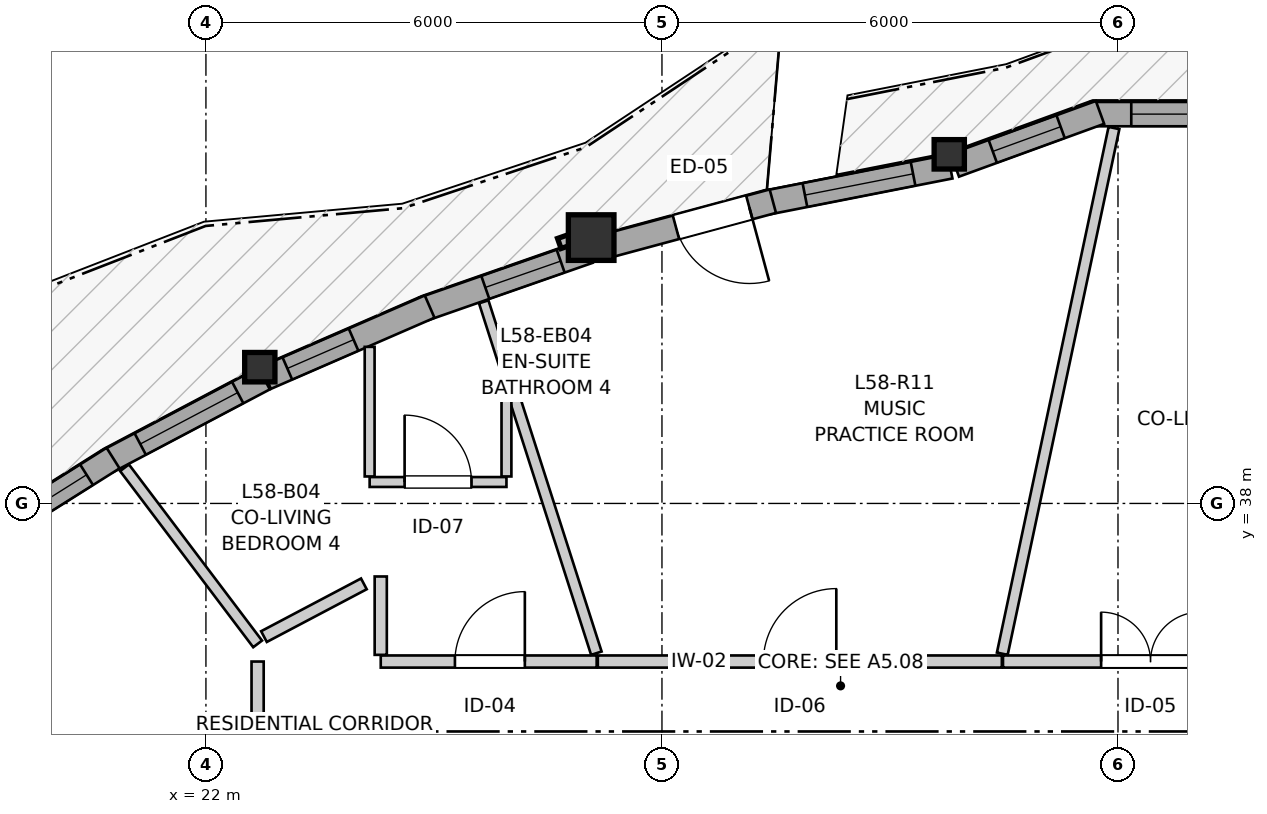
"""IFC4 building model, lengths in metres.
Left out: names, types, materials, properties, quantities, classifications, styles, units other than length and angle.
Written with IfcOpenShell. Run it as: python <this file> out.ifc"""

import sys

from ifc_helpers import new_model, si_unit, direction, frame, frame_2d, origin, origin_2d, place, context, subcontext, project, spatial, rectangle, i_section, extrude, source, transform, mapped, element, fill, save


model = new_model("IFC4")
c1 = context("Model", 3, precision=1e-05, world=origin(), true_north=direction((0.0, 1.0)))
c2 = subcontext(c1, "Body", "Model", "MODEL_VIEW")
j1 = project(units=[si_unit("LENGTHUNIT", "METRE"), si_unit("PLANEANGLEUNIT", "RADIAN")], contexts=[c1])
p1 = place(None, origin())
s1 = spatial("IfcSite", under=j1, at=p1, CompositionType="ELEMENT")
p2 = place(p1, origin())
s2 = spatial("IfcBuilding", under=s1, at=p2, CompositionType="ELEMENT")
p3 = place(p2, frame((0.0, 0.0, 195.6)))
s3 = spatial("IfcBuildingStorey", under=s2, at=p3, CompositionType="ELEMENT", Elevation=195.6)
m1 = source(origin(), c2, "Body", "SweptSolid", [
    extrude(i_section(OverallWidth=0.398, OverallDepth=0.387, WebThickness=0.019, FlangeThickness=0.03, FilletRadius=0.015, at=origin_2d()), origin(), (0.0, 0.0, 1.0), 2.96),
])
p4 = place(p3, frame((31.78, 42.593, 0.0), z_axis=(0.0, 0.0, 1.0), x_axis=(1.0, 0.0, 0.0)))
e1 = element("IfcColumn", 1, at=p4, inside=s3, PredefinedType="PILASTER", context=c2, shape_type="MappedRepresentation", body=[
    mapped(m1, transform((0.0, 0.0, 0.0), x_axis=(1.0, 0.0, 0.0), y_axis=(0.0, 1.0, 0.0), z_axis=(0.0, 0.0, 1.0), scale=1.0)),
])
m2 = source(origin(), c2, "Body", "SweptSolid", [
    extrude(rectangle(XDim=0.6, YDim=0.6, at=origin_2d()), origin(), (0.0, 0.0, 1.0), 2.96),
])
p5 = place(p3, frame((27.069, 41.498, 0.0), z_axis=(0.0, 0.0, 1.0), x_axis=(1.0, 0.0, 0.0)))
e2 = element("IfcColumn", 2, at=p5, inside=s3, PredefinedType="COLUMN", context=c2, shape_type="MappedRepresentation", body=[
    mapped(m2, transform((0.0, 0.0, 0.0), x_axis=(1.0, 0.0, 0.0), y_axis=(0.0, 1.0, 0.0), z_axis=(0.0, 0.0, 1.0), scale=1.0)),
])
p6 = place(p3, frame((22.709, 39.793, 0.0), z_axis=(0.0, 0.0, 1.0), x_axis=(1.0, 0.0, 0.0)))
e3 = element("IfcColumn", 3, at=p6, inside=s3, PredefinedType="PILASTER", context=c2, shape_type="MappedRepresentation", body=[
    mapped(m1, transform((0.0, 0.0, 0.0), x_axis=(1.0, 0.0, 0.0), y_axis=(0.0, 1.0, 0.0), z_axis=(0.0, 0.0, 1.0), scale=1.0)),
])
p7 = place(p3, frame((35.725, 43.122, 0.0), z_axis=(0.0, 0.0, 1.0), x_axis=(-1.0, 0.0, 0.0)))
e4 = element("IfcWall", 4, at=p7, inside=s3, PredefinedType="SOLIDWALL", context=c2, shape_type="SweptSolid", body=[
    extrude(rectangle(XDim=2.09, YDim=0.32, at=frame_2d((1.045, 0.0))), origin(), (0.0, 0.0, 1.0), 2.58),
])
p8 = place(p7, frame((0.301, 0.0, 0.82)))
e5 = element("IfcOpeningElement", 5, at=p8, cuts=e4, PredefinedType="OPENING", context=c2, shape_type="SweptSolid", body=[
    extrude(rectangle(XDim=1.25, YDim=1.35, at=frame_2d((0.625, 0.675))), frame((0.0, 0.17, 0.0), z_axis=(0.0, -1.0, 0.0), x_axis=(1.0, 0.0, 0.0)), (0.0, 0.0, 1.0), 0.34),
])
p9 = place(p3, frame((33.763, 43.145, 0.0), z_axis=(0.0, 0.0, 1.0), x_axis=(-0.939691662178, -0.342022777067, 0.0)))
e6 = element("IfcWall", 6, at=p9, inside=s3, PredefinedType="SOLIDWALL", context=c2, shape_type="SweptSolid", body=[
    extrude(rectangle(XDim=2.032, YDim=0.32, at=frame_2d((1.016, 0.0))), origin(), (0.0, 0.0, 1.0), 2.58),
])
p10 = place(p9, frame((0.551, 0.0, 0.82)))
e7 = element("IfcOpeningElement", 7, at=p10, cuts=e6, PredefinedType="OPENING", context=c2, shape_type="SweptSolid", body=[
    extrude(rectangle(XDim=0.95, YDim=1.35, at=frame_2d((0.475, 0.675))), frame((0.0, 0.17, 0.0), z_axis=(0.0, -1.0, 0.0), x_axis=(1.0, 0.0, 0.0)), (0.0, 0.0, 1.0), 0.34),
])
p11 = place(p3, frame((31.791, 42.432, 0.0), z_axis=(0.0, 0.0, 1.0), x_axis=(-0.981230743763, -0.192837308358, 0.0)))
e8 = element("IfcWall", 8, at=p11, inside=s3, PredefinedType="SOLIDWALL", context=c2, shape_type="SweptSolid", body=[
    extrude(rectangle(XDim=2.464, YDim=0.32, at=frame_2d((1.232, 0.0))), origin(), (0.0, 0.0, 1.0), 2.58),
])
p12 = place(p11, frame((0.497, 0.0, 0.82)))
e9 = element("IfcOpeningElement", 9, at=p12, cuts=e8, PredefinedType="OPENING", context=c2, shape_type="SweptSolid", body=[
    extrude(rectangle(XDim=1.45, YDim=1.25, at=frame_2d((0.725, 0.625))), frame((0.0, 0.17, 0.0), z_axis=(0.0, -1.0, 0.0), x_axis=(1.0, 0.0, 0.0)), (0.0, 0.0, 1.0), 0.34),
])
p13 = place(p3, frame((29.459, 41.977, 0.0), z_axis=(0.0, 0.0, 1.0), x_axis=(-0.965462644558, -0.260541516774, 0.0)))
e10 = element("IfcWall", 10, at=p13, inside=s3, PredefinedType="SOLIDWALL", context=c2, shape_type="SweptSolid", body=[
    extrude(rectangle(XDim=2.343, YDim=0.32, at=frame_2d((1.171, 0.0))), origin(), (0.0, 0.0, 1.0), 2.58),
])
p14 = place(p13, frame((0.32, 0.0, 0.0)))
e11 = element("IfcOpeningElement", 11, at=p14, cuts=e10, PredefinedType="OPENING", context=c2, shape_type="SweptSolid", body=[
    extrude(rectangle(XDim=1.0, YDim=2.1, at=frame_2d((0.5, 1.05))), frame((0.0, 0.17, 0.0), z_axis=(0.0, -1.0, 0.0), x_axis=(1.0, 0.0, 0.0)), (0.0, 0.0, 1.0), 0.34),
])
p15 = place(p3, frame((27.036, 41.317, 0.0), z_axis=(0.0, 0.0, 1.0), x_axis=(-0.944115832513, -0.329613857108, 0.0)))
e12 = element("IfcWall", 12, at=p15, inside=s3, PredefinedType="SOLIDWALL", context=c2, shape_type="SweptSolid", body=[
    extrude(rectangle(XDim=2.303, YDim=0.32, at=frame_2d((1.152, 0.0))), origin(), (0.0, 0.0, 1.0), 2.58),
])
p16 = place(p15, frame((0.391, 0.0, 0.82)))
e13 = element("IfcOpeningElement", 13, at=p16, cuts=e12, PredefinedType="OPENING", context=c2, shape_type="SweptSolid", body=[
    extrude(rectangle(XDim=1.05, YDim=1.45, at=frame_2d((0.525, 0.725))), frame((0.0, 0.17, 0.0), z_axis=(0.0, -1.0, 0.0), x_axis=(1.0, 0.0, 0.0)), (0.0, 0.0, 1.0), 0.34),
])
p17 = place(p3, frame((24.943, 40.59, 0.0), z_axis=(0.0, 0.0, 1.0), x_axis=(-0.917071710038, -0.398722307688, 0.0)))
e14 = element("IfcWall", 14, at=p17, inside=s3, PredefinedType="SOLIDWALL", context=c2, shape_type="SweptSolid", body=[
    extrude(rectangle(XDim=2.347, YDim=0.32, at=frame_2d((1.173, 0.0))), origin(), (0.0, 0.0, 1.0), 2.58),
])
p18 = place(p17, frame((1.091, 0.0, 0.82)))
e15 = element("IfcOpeningElement", 15, at=p18, cuts=e14, PredefinedType="OPENING", context=c2, shape_type="SweptSolid", body=[
    extrude(rectangle(XDim=0.95, YDim=1.35, at=frame_2d((0.475, 0.675))), frame((0.0, 0.17, 0.0), z_axis=(0.0, -1.0, 0.0), x_axis=(1.0, 0.0, 0.0)), (0.0, 0.0, 1.0), 0.34),
])
p19 = place(p3, frame((22.766, 39.642, 0.0), z_axis=(0.0, 0.0, 1.0), x_axis=(-0.884377555637, -0.466772256122, 0.0)))
e16 = element("IfcWall", 16, at=p19, inside=s3, PredefinedType="SOLIDWALL", context=c2, shape_type="SweptSolid", body=[
    extrude(rectangle(XDim=2.334, YDim=0.32, at=frame_2d((1.167, 0.0))), origin(), (0.0, 0.0, 1.0), 2.58),
])
p20 = place(p19, frame((0.393, 0.0, 0.82)))
e17 = element("IfcOpeningElement", 17, at=p20, cuts=e16, PredefinedType="OPENING", context=c2, shape_type="SweptSolid", body=[
    extrude(rectangle(XDim=1.45, YDim=1.25, at=frame_2d((0.725, 0.625))), frame((0.0, 0.17, 0.0), z_axis=(0.0, -1.0, 0.0), x_axis=(1.0, 0.0, 0.0)), (0.0, 0.0, 1.0), 0.34),
])
p21 = place(p3, frame((20.778, 38.597, 0.0), z_axis=(0.0, 0.0, 1.0), x_axis=(-0.84639489148, -0.532555807101, 0.0)))
e18 = element("IfcWall", 18, at=p21, inside=s3, PredefinedType="SOLIDWALL", context=c2, shape_type="SweptSolid", body=[
    extrude(rectangle(XDim=2.264, YDim=0.32, at=frame_2d((1.132, 0.0))), origin(), (0.0, 0.0, 1.0), 2.58),
])
p22 = place(p21, frame((0.412, 0.0, 0.82)))
e19 = element("IfcOpeningElement", 19, at=p22, cuts=e18, PredefinedType="OPENING", context=c2, shape_type="SweptSolid", body=[
    extrude(rectangle(XDim=1.45, YDim=1.25, at=frame_2d((0.725, 0.625))), frame((0.0, 0.17, 0.0), z_axis=(0.0, -1.0, 0.0), x_axis=(1.0, 0.0, 0.0)), (0.0, 0.0, 1.0), 0.34),
])
p23 = place(p3, frame((27.156, 35.92, 0.0), z_axis=(0.0, 0.0, 1.0), x_axis=(1.0, 0.0, 0.0)))
e20 = element("IfcWall", 20, at=p23, inside=s3, PredefinedType="PARTITIONING", context=c2, shape_type="SweptSolid", body=[
    extrude(rectangle(XDim=5.316, YDim=0.16, at=frame_2d((2.658, 0.0))), origin(), (0.0, 0.0, 1.0), 2.628),
])
p24 = place(p23, frame((2.178, 0.0, 0.0)))
e21 = element("IfcOpeningElement", 21, at=p24, cuts=e20, PredefinedType="OPENING", context=c2, shape_type="SweptSolid", body=[
    extrude(rectangle(XDim=0.96, YDim=2.1, at=frame_2d((0.48, 1.05))), frame((0.0, 0.09, 0.0), z_axis=(0.0, -1.0, 0.0), x_axis=(1.0, 0.0, 0.0)), (0.0, 0.0, 1.0), 0.18),
])
p25 = place(p3, frame((32.487, 35.92, 0.0), z_axis=(0.0, 0.0, 1.0), x_axis=(1.0, 0.0, 0.0)))
e22 = element("IfcWall", 22, at=p25, inside=s3, PredefinedType="PARTITIONING", context=c2, shape_type="SweptSolid", body=[
    extrude(rectangle(XDim=3.913, YDim=0.16, at=frame_2d((1.957, 0.0))), origin(), (0.0, 0.0, 1.0), 2.628),
])
p26 = place(p25, frame((1.291, 0.0, 0.0)))
e23 = element("IfcOpeningElement", 23, at=p26, cuts=e22, PredefinedType="OPENING", context=c2, shape_type="SweptSolid", body=[
    extrude(rectangle(XDim=1.3, YDim=2.1, at=frame_2d((0.65, 1.05))), frame((0.0, 0.09, 0.0), z_axis=(0.0, -1.0, 0.0), x_axis=(1.0, 0.0, 0.0)), (0.0, 0.0, 1.0), 0.18),
])
p27 = place(p3, frame((24.3, 35.92, 0.0), z_axis=(0.0, 0.0, 1.0), x_axis=(1.0, 0.0, 0.0)))
e24 = element("IfcWall", 24, at=p27, inside=s3, PredefinedType="PARTITIONING", context=c2, shape_type="SweptSolid", body=[
    extrude(rectangle(XDim=2.841, YDim=0.16, at=frame_2d((1.42, 0.0))), origin(), (0.0, 0.0, 1.0), 2.96),
])
p28 = place(p27, frame((0.976, 0.0, 0.0)))
e25 = element("IfcOpeningElement", 25, at=p28, cuts=e24, PredefinedType="OPENING", context=c2, shape_type="SweptSolid", body=[
    extrude(rectangle(XDim=0.92, YDim=2.1, at=frame_2d((0.46, 1.05))), frame((0.0, 0.09, 0.0), z_axis=(0.0, -1.0, 0.0), x_axis=(1.0, 0.0, 0.0)), (0.0, 0.0, 1.0), 0.18),
])
p29 = place(p3, frame((24.154, 38.282, 0.0), z_axis=(0.0, 0.0, 1.0), x_axis=(1.0, 0.0, 0.0)))
e26 = element("IfcWall", 26, at=p29, inside=s3, PredefinedType="PARTITIONING", context=c2, shape_type="SweptSolid", body=[
    extrude(rectangle(XDim=1.8, YDim=0.13, at=frame_2d((0.9, 0.0))), origin(), (0.0, 0.0, 1.0), 2.96),
])
p30 = place(p29, frame((0.46, 0.0, 0.0)))
e27 = element("IfcOpeningElement", 27, at=p30, cuts=e26, PredefinedType="OPENING", context=c2, shape_type="SweptSolid", body=[
    extrude(rectangle(XDim=0.88, YDim=2.05, at=frame_2d((0.44, 1.025))), frame((0.0, 0.075, 0.0), z_axis=(0.0, -1.0, 0.0), x_axis=(1.0, 0.0, 0.0)), (0.0, 0.0, 1.0), 0.15),
])
p31 = place(p3, frame((32.478, 36.023, 0.0), z_axis=(0.0, 0.0, 1.0), x_axis=(0.207795571792, 0.978172275391, 0.0)))
e28 = element("IfcWall", 28, at=p31, inside=s3, PredefinedType="PARTITIONING", context=c2, shape_type="SweptSolid", body=[
    extrude(rectangle(XDim=7.071, YDim=0.145, at=frame_2d((3.535, 0.0))), origin(), (0.0, 0.0, 1.0), 2.96),
])
p32 = place(p3, frame((25.939, 39.767, 0.0), z_axis=(0.0, 0.0, 1.0), x_axis=(0.305195538028, -0.952289705693, 0.0)))
e29 = element("IfcWall", 29, at=p32, inside=s3, PredefinedType="PARTITIONING", context=c2, shape_type="SweptSolid", body=[
    extrude(rectangle(XDim=3.925, YDim=0.145, at=frame_2d((1.962, 0.0))), origin(), (0.0, 0.0, 1.0), 2.96),
])
p33 = place(p3, frame((20.929, 38.469, 0.0), z_axis=(0.0, 0.0, 1.0), x_axis=(0.602847358209, -0.797856542682, 0.0)))
e30 = element("IfcWall", 30, at=p33, inside=s3, PredefinedType="PARTITIONING", context=c2, shape_type="SweptSolid", body=[
    extrude(rectangle(XDim=2.905, YDim=0.145, at=frame_2d((1.452, 0.0))), origin(), (0.0, 0.0, 1.0), 2.96),
])
p34 = place(p3, frame((24.154, 38.355, 0.0), z_axis=(0.0, 0.0, 1.0), x_axis=(0.0, 1.0, 0.0)))
e31 = element("IfcWall", 31, at=p34, inside=s3, PredefinedType="PARTITIONING", context=c2, shape_type="SweptSolid", body=[
    extrude(rectangle(XDim=1.705, YDim=0.13, at=frame_2d((0.853, 0.0))), origin(), (0.0, 0.0, 1.0), 2.96),
])
p35 = place(p3, frame((22.68, 34.315, 0.0), z_axis=(0.0, 0.0, 1.0), x_axis=(0.0, 1.0, 0.0)))
e32 = element("IfcWall", 32, at=p35, inside=s3, PredefinedType="PARTITIONING", context=c2, shape_type="SweptSolid", body=[
    extrude(rectangle(XDim=1.605, YDim=0.16, at=frame_2d((0.802, 0.0))), origin(), (0.0, 0.0, 1.0), 2.96),
])
p36 = place(p3, frame((22.764, 36.248, 0.0), z_axis=(0.0, 0.0, 1.0), x_axis=(0.884318813942, 0.466883535059, 0.0)))
e33 = element("IfcWall", 33, at=p36, inside=s3, PredefinedType="PARTITIONING", context=c2, shape_type="SweptSolid", body=[
    extrude(rectangle(XDim=1.486, YDim=0.16, at=frame_2d((0.743, 0.0))), origin(), (0.0, 0.0, 1.0), 2.96),
])
p37 = place(p3, frame((25.954, 38.355, 0.0), z_axis=(0.0, 0.0, 1.0), x_axis=(0.0, 1.0, 0.0)))
e34 = element("IfcWall", 34, at=p37, inside=s3, PredefinedType="PARTITIONING", context=c2, shape_type="SweptSolid", body=[
    extrude(rectangle(XDim=1.125, YDim=0.13, at=frame_2d((0.562, 0.0))), origin(), (0.0, 0.0, 1.0), 2.96),
])
p38 = place(p3, frame((24.3, 36.008, 0.0), z_axis=(0.0, 0.0, 1.0), x_axis=(0.0, 1.0, 0.0)))
e35 = element("IfcWall", 35, at=p38, inside=s3, PredefinedType="PARTITIONING", context=c2, shape_type="SweptSolid", body=[
    extrude(rectangle(XDim=1.031, YDim=0.16, at=frame_2d((0.516, 0.0))), origin(), (0.0, 0.0, 1.0), 2.96),
])
p39 = place(p3, frame((25.655, 40.652, 0.0), z_axis=(0.0, 0.0, 1.0), x_axis=(0.305317972149, -0.952250458589, 0.0)))
e36 = element("IfcWall", 36, at=p39, inside=s3, PredefinedType="PARTITIONING", context=c2, shape_type="SweptSolid", body=[
    extrude(rectangle(XDim=0.915, YDim=0.13, at=frame_2d((0.458, 0.0))), origin(), (0.0, 0.0, 1.0), 2.96),
])
m3 = source(origin(), c2, "Body", "SweptSolid", [
    extrude(rectangle(XDim=1.25, YDim=1.35, at=frame_2d((0.625, 0.675))), frame((0.0, 0.03, 0.0), z_axis=(0.0, -1.0, 0.0), x_axis=(1.0, 0.0, 0.0)), (0.0, 0.0, 1.0), 0.06),
])
p40 = place(p8, origin())
e37 = element("IfcWindow", 37, at=p40, inside=s3, PartitioningType="SINGLE_PANEL", PredefinedType="WINDOW", context=c2, shape_type="MappedRepresentation", body=[
    mapped(m3, transform((0.0, 0.0, 0.0), x_axis=(1.0, 0.0, 0.0), y_axis=(0.0, 1.0, 0.0), z_axis=(0.0, 0.0, 1.0), scale=1.0)),
])
fill(e5, e37)
m4 = source(origin(), c2, "Body", "SweptSolid", [
    extrude(rectangle(XDim=0.95, YDim=1.35, at=frame_2d((0.475, 0.675))), frame((0.0, 0.03, 0.0), z_axis=(0.0, -1.0, 0.0), x_axis=(1.0, 0.0, 0.0)), (0.0, 0.0, 1.0), 0.06),
])
p41 = place(p10, origin())
e38 = element("IfcWindow", 38, at=p41, inside=s3, PartitioningType="SINGLE_PANEL", PredefinedType="WINDOW", context=c2, shape_type="MappedRepresentation", body=[
    mapped(m4, transform((0.0, 0.0, 0.0), x_axis=(1.0, 0.0, 0.0), y_axis=(0.0, 1.0, 0.0), z_axis=(0.0, 0.0, 1.0), scale=1.0)),
])
fill(e7, e38)
m5 = source(origin(), c2, "Body", "SweptSolid", [
    extrude(rectangle(XDim=1.45, YDim=1.25, at=frame_2d((0.725, 0.625))), frame((0.0, 0.03, 0.0), z_axis=(0.0, -1.0, 0.0), x_axis=(1.0, 0.0, 0.0)), (0.0, 0.0, 1.0), 0.06),
])
p42 = place(p12, origin())
e39 = element("IfcWindow", 39, at=p42, inside=s3, PartitioningType="SINGLE_PANEL", PredefinedType="WINDOW", context=c2, shape_type="MappedRepresentation", body=[
    mapped(m5, transform((0.0, 0.0, 0.0), x_axis=(1.0, 0.0, 0.0), y_axis=(0.0, 1.0, 0.0), z_axis=(0.0, 0.0, 1.0), scale=1.0)),
])
fill(e9, e39)
m6 = source(origin(), c2, "Body", "SweptSolid", [
    extrude(rectangle(XDim=1.05, YDim=1.45, at=frame_2d((0.525, 0.725))), frame((0.0, 0.03, 0.0), z_axis=(0.0, -1.0, 0.0), x_axis=(1.0, 0.0, 0.0)), (0.0, 0.0, 1.0), 0.06),
])
p43 = place(p16, origin())
e40 = element("IfcWindow", 40, at=p43, inside=s3, PartitioningType="SINGLE_PANEL", PredefinedType="WINDOW", context=c2, shape_type="MappedRepresentation", body=[
    mapped(m6, transform((0.0, 0.0, 0.0), x_axis=(1.0, 0.0, 0.0), y_axis=(0.0, 1.0, 0.0), z_axis=(0.0, 0.0, 1.0), scale=1.0)),
])
fill(e13, e40)
p44 = place(p18, origin())
e41 = element("IfcWindow", 41, at=p44, inside=s3, PartitioningType="SINGLE_PANEL", PredefinedType="WINDOW", context=c2, shape_type="MappedRepresentation", body=[
    mapped(m4, transform((0.0, 0.0, 0.0), x_axis=(1.0, 0.0, 0.0), y_axis=(0.0, 1.0, 0.0), z_axis=(0.0, 0.0, 1.0), scale=1.0)),
])
fill(e15, e41)
p45 = place(p20, origin())
e42 = element("IfcWindow", 42, at=p45, inside=s3, PartitioningType="SINGLE_PANEL", PredefinedType="WINDOW", context=c2, shape_type="MappedRepresentation", body=[
    mapped(m5, transform((0.0, 0.0, 0.0), x_axis=(1.0, 0.0, 0.0), y_axis=(0.0, 1.0, 0.0), z_axis=(0.0, 0.0, 1.0), scale=1.0)),
])
fill(e17, e42)
p46 = place(p22, origin())
e43 = element("IfcWindow", 43, at=p46, inside=s3, PartitioningType="SINGLE_PANEL", PredefinedType="WINDOW", context=c2, shape_type="MappedRepresentation", body=[
    mapped(m5, transform((0.0, 0.0, 0.0), x_axis=(1.0, 0.0, 0.0), y_axis=(0.0, 1.0, 0.0), z_axis=(0.0, 0.0, 1.0), scale=1.0)),
])
fill(e19, e43)
m7 = source(origin(), c2, "Body", "SweptSolid", [
    extrude(rectangle(XDim=1.0, YDim=2.1, at=frame_2d((0.5, 1.05))), frame((0.0, 0.025, 0.0), z_axis=(0.0, -1.0, 0.0), x_axis=(1.0, 0.0, 0.0)), (0.0, 0.0, 1.0), 0.05),
])
p47 = place(p14, origin())
e44 = element("IfcDoor", 44, at=p47, inside=s3, OperationType="SINGLE_SWING_LEFT", PredefinedType="DOOR", context=c2, shape_type="MappedRepresentation", body=[
    mapped(m7, transform((0.0, 0.0, 0.0), x_axis=(1.0, 0.0, 0.0), y_axis=(0.0, 1.0, 0.0), z_axis=(0.0, 0.0, 1.0), scale=1.0)),
])
fill(e11, e44)
m8 = source(origin(), c2, "Body", "SweptSolid", [
    extrude(rectangle(XDim=0.96, YDim=2.1, at=frame_2d((0.48, 1.05))), frame((0.0, 0.025, 0.0), z_axis=(0.0, -1.0, 0.0), x_axis=(1.0, 0.0, 0.0)), (0.0, 0.0, 1.0), 0.05),
])
p48 = place(p24, origin())
e45 = element("IfcDoor", 45, at=p48, inside=s3, OperationType="SINGLE_SWING_RIGHT", PredefinedType="DOOR", context=c2, shape_type="MappedRepresentation", body=[
    mapped(m8, transform((0.0, 0.0, 0.0), x_axis=(1.0, 0.0, 0.0), y_axis=(0.0, 1.0, 0.0), z_axis=(0.0, 0.0, 1.0), scale=1.0)),
])
fill(e21, e45)
m9 = source(origin(), c2, "Body", "SweptSolid", [
    extrude(rectangle(XDim=1.3, YDim=2.1, at=frame_2d((0.65, 1.05))), frame((0.0, 0.025, 0.0), z_axis=(0.0, -1.0, 0.0), x_axis=(1.0, 0.0, 0.0)), (0.0, 0.0, 1.0), 0.05),
])
p49 = place(p26, origin())
e46 = element("IfcDoor", 46, at=p49, inside=s3, OperationType="DOUBLE_DOOR_SINGLE_SWING", PredefinedType="DOOR", context=c2, shape_type="MappedRepresentation", body=[
    mapped(m9, transform((0.0, 0.0, 0.0), x_axis=(1.0, 0.0, 0.0), y_axis=(0.0, 1.0, 0.0), z_axis=(0.0, 0.0, 1.0), scale=1.0)),
])
fill(e23, e46)
m10 = source(origin(), c2, "Body", "SweptSolid", [
    extrude(rectangle(XDim=0.92, YDim=2.1, at=frame_2d((0.46, 1.05))), frame((0.0, 0.025, 0.0), z_axis=(0.0, -1.0, 0.0), x_axis=(1.0, 0.0, 0.0)), (0.0, 0.0, 1.0), 0.05),
])
p50 = place(p28, origin())
e47 = element("IfcDoor", 47, at=p50, inside=s3, OperationType="SINGLE_SWING_RIGHT", PredefinedType="DOOR", context=c2, shape_type="MappedRepresentation", body=[
    mapped(m10, transform((0.0, 0.0, 0.0), x_axis=(1.0, 0.0, 0.0), y_axis=(0.0, 1.0, 0.0), z_axis=(0.0, 0.0, 1.0), scale=1.0)),
])
fill(e25, e47)
m11 = source(origin(), c2, "Body", "SweptSolid", [
    extrude(rectangle(XDim=0.88, YDim=2.05, at=frame_2d((0.44, 1.025))), frame((0.0, 0.025, 0.0), z_axis=(0.0, -1.0, 0.0), x_axis=(1.0, 0.0, 0.0)), (0.0, 0.0, 1.0), 0.05),
])
p51 = place(p30, origin())
e48 = element("IfcDoor", 48, at=p51, inside=s3, OperationType="SINGLE_SWING_LEFT", PredefinedType="DOOR", context=c2, shape_type="MappedRepresentation", body=[
    mapped(m11, transform((0.0, 0.0, 0.0), x_axis=(1.0, 0.0, 0.0), y_axis=(0.0, 1.0, 0.0), z_axis=(0.0, 0.0, 1.0), scale=1.0)),
])
fill(e27, e48)
save(model, sys.argv[1])
